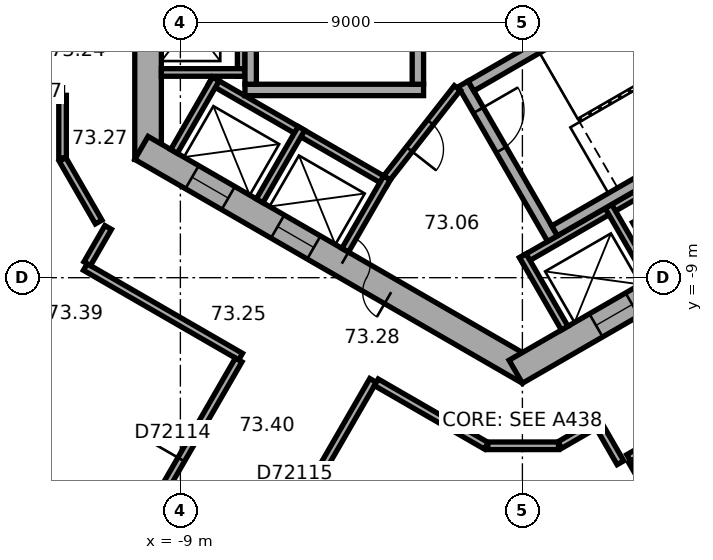
"""IFC4 building model, lengths in metres.
Left out: names, types, materials, properties, quantities, classifications, styles, units other than length and angle.
Written with IfcOpenShell. Run it as: python <this file> out.ifc"""

import sys

from ifc_helpers import new_model, si_unit, direction, frame, frame_2d, origin, place, context, subcontext, project, spatial, rectangle, extrude, element, fill, save


model = new_model("IFC4")
c1 = context("Model", 3, precision=1e-05, world=origin(), true_north=direction((0.0, 1.0)))
c2 = subcontext(c1, "Body", "Model", "MODEL_VIEW")
j1 = project(units=[si_unit("LENGTHUNIT", "METRE"), si_unit("PLANEANGLEUNIT", "RADIAN")], contexts=[c1])
p1 = place(None, origin())
s1 = spatial("IfcSite", under=j1, at=p1, CompositionType="ELEMENT")
p2 = place(p1, origin())
s2 = spatial("IfcBuilding", under=s1, at=p2, CompositionType="ELEMENT")
p3 = place(p2, frame((0.0, 0.0, 296.8)))
s3 = spatial("IfcBuildingStorey", under=s2, at=p3, CompositionType="ELEMENT", Elevation=296.8)
p4 = place(p3, frame((-9.85, 5.889, 0.0), z_axis=(0.0, 0.0, 1.0), x_axis=(0.0, -1.0, 0.0)))
e1 = element("IfcWall", 1, at=p4, inside=s3, PredefinedType="SHEAR", context=c2, shape_type="SweptSolid", body=[
    extrude(rectangle(XDim=11.778, YDim=0.7, at=frame_2d((5.889, 0.0))), origin(), (0.0, 0.0, 1.0), 3.7),
])
p5 = place(p4, frame((5.039, 0.0, 0.0)))
e2 = element("IfcOpeningElement", 2, at=p5, cuts=e1, PredefinedType="OPENING", context=c2, shape_type="SweptSolid", body=[
    extrude(rectangle(XDim=1.1, YDim=2.1, at=frame_2d((0.55, 1.05))), frame((0.0, 0.36, 0.0), z_axis=(0.0, -1.0, 0.0), x_axis=(1.0, 0.0, 0.0)), (0.0, 0.0, 1.0), 0.72),
])
p6 = place(p4, frame((7.639, 0.0, 0.0)))
e3 = element("IfcOpeningElement", 3, at=p6, cuts=e1, PredefinedType="OPENING", context=c2, shape_type="SweptSolid", body=[
    extrude(rectangle(XDim=1.1, YDim=2.1, at=frame_2d((0.55, 1.05))), frame((0.0, 0.36, 0.0), z_axis=(0.0, -1.0, 0.0), x_axis=(1.0, 0.0, 0.0)), (0.0, 0.0, 1.0), 0.72),
])
p7 = place(p3, frame((-10.025, -5.586, 0.0), z_axis=(0.0, 0.0, 1.0), x_axis=(0.866026453023, -0.499998182661, 0.0)))
e4 = element("IfcWall", 4, at=p7, inside=s3, PredefinedType="SHEAR", context=c2, shape_type="SweptSolid", body=[
    extrude(rectangle(XDim=11.778, YDim=0.7, at=frame_2d((5.889, 0.0))), origin(), (0.0, 0.0, 1.0), 3.7),
])
p8 = place(p7, frame((6.089, 0.0, 0.0)))
e5 = element("IfcOpeningElement", 5, at=p8, cuts=e4, PredefinedType="OPENING", context=c2, shape_type="SweptSolid", body=[
    extrude(rectangle(XDim=1.5, YDim=2.1, at=frame_2d((0.75, 1.05))), frame((0.0, 0.36, 0.0), z_axis=(0.0, -1.0, 0.0), x_axis=(1.0, 0.0, 0.0)), (0.0, 0.0, 1.0), 0.72),
])
p9 = place(p7, frame((1.539, 0.0, 0.0)))
e6 = element("IfcOpeningElement", 6, at=p9, cuts=e4, PredefinedType="OPENING", context=c2, shape_type="SweptSolid", body=[
    extrude(rectangle(XDim=1.1, YDim=2.1, at=frame_2d((0.55, 1.05))), frame((0.0, 0.36, 0.0), z_axis=(0.0, -1.0, 0.0), x_axis=(1.0, 0.0, 0.0)), (0.0, 0.0, 1.0), 0.72),
])
p10 = place(p7, frame((4.139, 0.0, 0.0)))
e7 = element("IfcOpeningElement", 7, at=p10, cuts=e4, PredefinedType="OPENING", context=c2, shape_type="SweptSolid", body=[
    extrude(rectangle(XDim=1.1, YDim=2.1, at=frame_2d((0.55, 1.05))), frame((0.0, 0.36, 0.0), z_axis=(0.0, -1.0, 0.0), x_axis=(1.0, 0.0, 0.0)), (0.0, 0.0, 1.0), 0.72),
])
p11 = place(p3, frame((-0.175, -11.475, 0.0), z_axis=(0.0, 0.0, 1.0), x_axis=(0.866026453023, 0.499998182661, 0.0)))
e8 = element("IfcWall", 8, at=p11, inside=s3, PredefinedType="SHEAR", context=c2, shape_type="SweptSolid", body=[
    extrude(rectangle(XDim=11.778, YDim=0.7, at=frame_2d((5.889, 0.0))), origin(), (0.0, 0.0, 1.0), 3.7),
])
p12 = place(p11, frame((2.439, 0.0, 0.0)))
e9 = element("IfcOpeningElement", 9, at=p12, cuts=e8, PredefinedType="OPENING", context=c2, shape_type="SweptSolid", body=[
    extrude(rectangle(XDim=1.1, YDim=2.1, at=frame_2d((0.55, 1.05))), frame((0.0, 0.36, 0.0), z_axis=(0.0, -1.0, 0.0), x_axis=(1.0, 0.0, 0.0)), (0.0, 0.0, 1.0), 0.72),
])
p13 = place(p11, frame((5.039, 0.0, 0.0)))
e10 = element("IfcOpeningElement", 10, at=p13, cuts=e8, PredefinedType="OPENING", context=c2, shape_type="SweptSolid", body=[
    extrude(rectangle(XDim=1.1, YDim=2.1, at=frame_2d((0.55, 1.05))), frame((0.0, 0.36, 0.0), z_axis=(0.0, -1.0, 0.0), x_axis=(1.0, 0.0, 0.0)), (0.0, 0.0, 1.0), 0.72),
])
p14 = place(p11, frame((7.639, 0.0, 0.0)))
e11 = element("IfcOpeningElement", 11, at=p14, cuts=e8, PredefinedType="OPENING", context=c2, shape_type="SweptSolid", body=[
    extrude(rectangle(XDim=1.1, YDim=2.1, at=frame_2d((0.55, 1.05))), frame((0.0, 0.36, 0.0), z_axis=(0.0, -1.0, 0.0), x_axis=(1.0, 0.0, 0.0)), (0.0, 0.0, 1.0), 0.72),
])
p15 = place(p3, frame((-16.626, -12.629, 0.0), z_axis=(0.0, 0.0, 1.0), x_axis=(0.866026460444, -0.499998169808, 0.0)))
e12 = element("IfcWall", 12, at=p15, inside=s3, PredefinedType="STANDARD", context=c2, shape_type="SweptSolid", body=[
    extrude(rectangle(XDim=17.731, YDim=0.2, at=frame_2d((8.866, 0.0))), origin(), (0.0, 0.0, 1.0), 3.7),
])
p16 = place(p15, frame((1.203, 0.0, 0.9)))
e13 = element("IfcOpeningElement", 13, at=p16, cuts=e12, PredefinedType="OPENING", context=c2, shape_type="SweptSolid", body=[
    extrude(rectangle(XDim=2.0, YDim=2.0, at=frame_2d((1.0, 1.0))), frame((0.0, 0.11, 0.0), z_axis=(0.0, -1.0, 0.0), x_axis=(1.0, 0.0, 0.0)), (0.0, 0.0, 1.0), 0.22),
])
p17 = place(p15, frame((4.535, 0.0, 0.9)))
e14 = element("IfcOpeningElement", 14, at=p17, cuts=e12, PredefinedType="OPENING", context=c2, shape_type="SweptSolid", body=[
    extrude(rectangle(XDim=2.0, YDim=2.0, at=frame_2d((1.0, 1.0))), frame((0.0, 0.11, 0.0), z_axis=(0.0, -1.0, 0.0), x_axis=(1.0, 0.0, 0.0)), (0.0, 0.0, 1.0), 0.22),
])
p18 = place(p15, frame((7.867, 0.0, 0.9)))
e15 = element("IfcOpeningElement", 15, at=p18, cuts=e12, PredefinedType="OPENING", context=c2, shape_type="SweptSolid", body=[
    extrude(rectangle(XDim=2.0, YDim=2.0, at=frame_2d((1.0, 1.0))), frame((0.0, 0.11, 0.0), z_axis=(0.0, -1.0, 0.0), x_axis=(1.0, 0.0, 0.0)), (0.0, 0.0, 1.0), 0.22),
])
p19 = place(p15, frame((11.198, 0.0, 0.9)))
e16 = element("IfcOpeningElement", 16, at=p19, cuts=e12, PredefinedType="OPENING", context=c2, shape_type="SweptSolid", body=[
    extrude(rectangle(XDim=2.0, YDim=2.0, at=frame_2d((1.0, 1.0))), frame((0.0, 0.11, 0.0), z_axis=(0.0, -1.0, 0.0), x_axis=(1.0, 0.0, 0.0)), (0.0, 0.0, 1.0), 0.22),
])
p20 = place(p15, frame((14.53, 0.0, 0.9)))
e17 = element("IfcOpeningElement", 17, at=p20, cuts=e12, PredefinedType="OPENING", context=c2, shape_type="SweptSolid", body=[
    extrude(rectangle(XDim=2.0, YDim=2.0, at=frame_2d((1.0, 1.0))), frame((0.0, 0.11, 0.0), z_axis=(0.0, -1.0, 0.0), x_axis=(1.0, 0.0, 0.0)), (0.0, 0.0, 1.0), 0.22),
])
p21 = place(p3, frame((2.58, -21.377, 0.0), z_axis=(0.0, 0.0, 1.0), x_axis=(0.833888592176, 0.551932800112, 0.0)))
e18 = element("IfcWall", 18, at=p21, inside=s3, PredefinedType="STANDARD", context=c2, shape_type="SweptSolid", body=[
    extrude(rectangle(XDim=17.731, YDim=0.2, at=frame_2d((8.866, 0.0))), origin(), (0.0, 0.0, 1.0), 3.7),
])
p22 = place(p21, frame((1.202, 0.0, 0.9)))
e19 = element("IfcOpeningElement", 19, at=p22, cuts=e18, PredefinedType="OPENING", context=c2, shape_type="SweptSolid", body=[
    extrude(rectangle(XDim=2.0, YDim=2.0, at=frame_2d((1.0, 1.0))), frame((0.0, 0.11, 0.0), z_axis=(0.0, -1.0, 0.0), x_axis=(1.0, 0.0, 0.0)), (0.0, 0.0, 1.0), 0.22),
])
p23 = place(p21, frame((4.533, 0.0, 0.9)))
e20 = element("IfcOpeningElement", 20, at=p23, cuts=e18, PredefinedType="OPENING", context=c2, shape_type="SweptSolid", body=[
    extrude(rectangle(XDim=2.0, YDim=2.0, at=frame_2d((1.0, 1.0))), frame((0.0, 0.11, 0.0), z_axis=(0.0, -1.0, 0.0), x_axis=(1.0, 0.0, 0.0)), (0.0, 0.0, 1.0), 0.22),
])
p24 = place(p21, frame((7.865, 0.0, 0.9)))
e21 = element("IfcOpeningElement", 21, at=p24, cuts=e18, PredefinedType="OPENING", context=c2, shape_type="SweptSolid", body=[
    extrude(rectangle(XDim=2.0, YDim=2.0, at=frame_2d((1.0, 1.0))), frame((0.0, 0.11, 0.0), z_axis=(0.0, -1.0, 0.0), x_axis=(1.0, 0.0, 0.0)), (0.0, 0.0, 1.0), 0.22),
])
p25 = place(p21, frame((11.197, 0.0, 0.9)))
e22 = element("IfcOpeningElement", 22, at=p25, cuts=e18, PredefinedType="OPENING", context=c2, shape_type="SweptSolid", body=[
    extrude(rectangle(XDim=2.0, YDim=2.0, at=frame_2d((1.0, 1.0))), frame((0.0, 0.11, 0.0), z_axis=(0.0, -1.0, 0.0), x_axis=(1.0, 0.0, 0.0)), (0.0, 0.0, 1.0), 0.22),
])
p26 = place(p21, frame((14.528, 0.0, 0.9)))
e23 = element("IfcOpeningElement", 23, at=p26, cuts=e18, PredefinedType="OPENING", context=c2, shape_type="SweptSolid", body=[
    extrude(rectangle(XDim=2.0, YDim=2.0, at=frame_2d((1.0, 1.0))), frame((0.0, 0.11, 0.0), z_axis=(0.0, -1.0, 0.0), x_axis=(1.0, 0.0, 0.0)), (0.0, 0.0, 1.0), 0.22),
])
p27 = place(p3, frame((-7.4, 4.3, 0.0), z_axis=(0.0, 0.0, 1.0), x_axis=(0.0, -1.0, 0.0)))
e24 = element("IfcWall", 24, at=p27, inside=s3, PredefinedType="PARTITIONING", context=c2, shape_type="SweptSolid", body=[
    extrude(rectangle(XDim=8.0, YDim=0.2, at=frame_2d((4.0, 0.0))), origin(), (0.0, 0.0, 1.0), 3.35),
])
p28 = place(p3, frame((-7.3, -3.6, 0.0), z_axis=(0.0, 0.0, 1.0), x_axis=(-1.0, 0.0, 0.0)))
e25 = element("IfcWall", 25, at=p28, inside=s3, PredefinedType="PARTITIONING", context=c2, shape_type="SweptSolid", body=[
    extrude(rectangle(XDim=2.2, YDim=0.2, at=frame_2d((1.1, 0.0))), origin(), (0.0, 0.0, 1.0), 3.35),
])
p29 = place(p3, frame((-8.203, -3.809, 0.0), z_axis=(0.0, 0.0, 1.0), x_axis=(0.866028230842, -0.499995103361, 0.0)))
e26 = element("IfcWall", 26, at=p29, inside=s3, PredefinedType="PARTITIONING", context=c2, shape_type="SweptSolid", body=[
    extrude(rectangle(XDim=5.4, YDim=0.2, at=frame_2d((2.7, 0.0))), origin(), (0.0, 0.0, 1.0), 3.35),
])
for number, where, z_axis, x_axis in (
    (27, (-8.067, -3.772, 0.0), (0.0, 0.0, 1.0), (-0.5, -0.866, 0.0)),
    (28, (-5.815, -5.072, 0.0), (0.0, 0.0, 1.0), (-0.5, -0.866, 0.0)),
):
    element("IfcWall", number, at=place(p3, frame(where, z_axis=z_axis, x_axis=x_axis)), inside=s3, PredefinedType="PARTITIONING", context=c2, shape_type="SweptSolid", body=[
        extrude(rectangle(XDim=2.2, YDim=0.2, at=frame_2d((1.1, 0.0))), origin(), (0.0, 0.0, 1.0), 3.35),
    ])
p30 = place(p3, frame((-3.563, -6.372, 0.0), z_axis=(0.0, 0.0, 1.0), x_axis=(-0.499994660107, -0.866028486751, 0.0)))
e29 = element("IfcWall", 29, at=p30, inside=s3, PredefinedType="PARTITIONING", context=c2, shape_type="SweptSolid", body=[
    extrude(rectangle(XDim=2.2, YDim=0.2, at=frame_2d((1.1, 0.0))), origin(), (0.0, 0.0, 1.0), 3.35),
])
p31 = place(p3, frame((-0.024, -8.559, 0.0), z_axis=(0.0, 0.0, 1.0), x_axis=(0.866026010844, 0.49999894854, 0.0)))
e30 = element("IfcWall", 30, at=p31, inside=s3, PredefinedType="PARTITIONING", context=c2, shape_type="SweptSolid", body=[
    extrude(rectangle(XDim=8.0, YDim=0.2, at=frame_2d((4.0, 0.0))), origin(), (0.0, 0.0, 1.0), 3.35),
])
for number, where, z_axis, x_axis in (
    (31, (0.013, -8.422, 0.0), (0.0, 0.0, 1.0), (0.5, -0.866, 0.0)),
    (32, (2.264, -7.122, 0.0), (0.0, 0.0, 1.0), (0.5, -0.866, 0.0)),
):
    element("IfcWall", number, at=place(p3, frame(where, z_axis=z_axis, x_axis=x_axis)), inside=s3, PredefinedType="PARTITIONING", context=c2, shape_type="SweptSolid", body=[
        extrude(rectangle(XDim=2.2, YDim=0.2, at=frame_2d((1.1, 0.0))), origin(), (0.0, 0.0, 1.0), 3.35),
    ])
p32 = place(p3, frame((-2.6, -4.06, 0.0), z_axis=(0.0, 0.0, 1.0), x_axis=(-1.0, 0.0, 0.0)))
e33 = element("IfcWall", 33, at=p32, inside=s3, PredefinedType="SHEAR", context=c2, shape_type="SweptSolid", body=[
    extrude(rectangle(XDim=4.7, YDim=0.3, at=frame_2d((2.35, 0.0))), origin(), (0.0, 0.0, 1.0), 3.35),
])
for number, where, z_axis, x_axis in (
    (34, (-2.75, 3.15, 0.0), (0.0, 0.0, 1.0), (0.0, -1.0, 0.0)),
    (35, (-7.15, 3.15, 0.0), (0.0, 0.0, 1.0), (0.0, -1.0, 0.0)),
):
    element("IfcWall", number, at=place(p3, frame(where, z_axis=z_axis, x_axis=x_axis)), inside=s3, PredefinedType="SHEAR", context=c2, shape_type="SweptSolid", body=[
        extrude(rectangle(XDim=7.06, YDim=0.3, at=frame_2d((3.53, 0.0))), origin(), (0.0, 0.0, 1.0), 3.35),
    ])
p33 = place(p3, frame((-1.558, -3.902, 0.0), z_axis=(0.0, 0.0, 1.0), x_axis=(0.499977259774, -0.866038532462, 0.0)))
e36 = element("IfcWall", 36, at=p33, inside=s3, PredefinedType="SHEAR", context=c2, shape_type="SweptSolid", body=[
    extrude(rectangle(XDim=4.7, YDim=0.3, at=frame_2d((2.35, 0.0))), origin(), (0.0, 0.0, 1.0), 3.35),
])
p34 = place(p33, frame((0.8, 0.0, 0.0)))
e37 = element("IfcOpeningElement", 37, at=p34, cuts=e36, PredefinedType="OPENING", context=c2, shape_type="SweptSolid", body=[
    extrude(rectangle(XDim=1.2, YDim=2.1, at=frame_2d((0.6, 1.05))), frame((0.0, 0.16, 0.0), z_axis=(0.0, -1.0, 0.0), x_axis=(1.0, 0.0, 0.0)), (0.0, 0.0, 1.0), 0.32),
])
for number, where, z_axis, x_axis in (
    (38, (-1.353, -3.957, 0.0), (0.0, 0.0, 1.0), (0.866, 0.5, 0.0)),
    (39, (0.847, -7.767, 0.0), (0.0, 0.0, 1.0), (0.866, 0.5, 0.0)),
):
    element("IfcWall", number, at=place(p3, frame(where, z_axis=z_axis, x_axis=x_axis)), inside=s3, PredefinedType="SHEAR", context=c2, shape_type="SweptSolid", body=[
        extrude(rectangle(XDim=7.06, YDim=0.3, at=frame_2d((3.53, 0.0))), origin(), (0.0, 0.0, 1.0), 3.35),
    ])
p35 = place(p3, frame((-1.712, -4.008, 0.0), z_axis=(0.0, 0.0, 1.0), x_axis=(-0.616549420702, -0.787316208287, 0.0)))
e40 = element("IfcWall", 40, at=p35, inside=s3, PredefinedType="PARTITIONING", context=c2, shape_type="SweptSolid", body=[
    extrude(rectangle(XDim=3.002, YDim=0.2, at=frame_2d((1.501, 0.0))), origin(), (0.0, 0.0, 1.0), 3.35),
])
p36 = place(p35, frame((1.15, 0.0, 0.0)))
e41 = element("IfcOpeningElement", 41, at=p36, cuts=e40, PredefinedType="OPENING", context=c2, shape_type="SweptSolid", body=[
    extrude(rectangle(XDim=0.9, YDim=2.1, at=frame_2d((0.45, 1.05))), frame((0.0, 0.11, 0.0), z_axis=(0.0, -1.0, 0.0), x_axis=(1.0, 0.0, 0.0)), (0.0, 0.0, 1.0), 0.22),
])
p37 = place(p3, frame((-13.301, -4.101, 0.0), z_axis=(0.0, 0.0, 1.0), x_axis=(1.0, 0.0, 0.0)))
e42 = element("IfcWall", 42, at=p37, inside=s3, PredefinedType="PARTITIONING", context=c2, shape_type="SweptSolid", body=[
    extrude(rectangle(XDim=1.201, YDim=0.2, at=frame_2d((0.601, 0.0))), origin(), (0.0, 0.0, 1.0), 3.35),
])
p38 = place(p3, frame((-12.1, -5.889, 0.0), z_axis=(0.0, 0.0, 1.0), x_axis=(0.500063520245, -0.865988727248, 0.0)))
e43 = element("IfcWall", 43, at=p38, inside=s3, PredefinedType="PARTITIONING", context=c2, shape_type="SweptSolid", body=[
    extrude(rectangle(XDim=1.9, YDim=0.2, at=frame_2d((0.95, 0.0))), origin(), (0.0, 0.0, 1.0), 3.35),
])
p39 = place(p3, frame((-12.1, -4.201, 0.0), z_axis=(0.0, 0.0, 1.0), x_axis=(0.0, -1.0, 0.0)))
e44 = element("IfcWall", 44, at=p39, inside=s3, PredefinedType="PARTITIONING", context=c2, shape_type="SweptSolid", body=[
    extrude(rectangle(XDim=1.648, YDim=0.2, at=frame_2d((0.824, 0.0))), origin(), (0.0, 0.0, 1.0), 3.35),
])
p40 = place(p3, frame((-11.501, -8.719, 0.0), z_axis=(0.0, 0.0, 1.0), x_axis=(0.866024434742, -0.500001678427, 0.0)))
e45 = element("IfcWall", 45, at=p40, inside=s3, PredefinedType="PARTITIONING", context=c2, shape_type="SweptSolid", body=[
    extrude(rectangle(XDim=4.718, YDim=0.2, at=frame_2d((2.359, 0.0))), origin(), (0.0, 0.0, 1.0), 3.35),
])
p41 = place(p3, frame((-10.901, -7.678, 0.0), z_axis=(0.0, 0.0, 1.0), x_axis=(-0.500074377092, -0.865982457891, 0.0)))
e46 = element("IfcWall", 46, at=p41, inside=s3, PredefinedType="PARTITIONING", context=c2, shape_type="SweptSolid", body=[
    extrude(rectangle(XDim=1.101, YDim=0.2, at=frame_2d((0.55, 0.0))), origin(), (0.0, 0.0, 1.0), 3.35),
])
p42 = place(p3, frame((-9.99, -15.537, 0.0), z_axis=(0.0, 0.0, 1.0), x_axis=(0.499966611936, 0.866044679534, 0.0)))
e47 = element("IfcWall", 47, at=p42, inside=s3, PredefinedType="PARTITIONING", context=c2, shape_type="SweptSolid", body=[
    extrude(rectangle(XDim=5.049, YDim=0.2, at=frame_2d((2.524, 0.0))), origin(), (0.0, 0.0, 1.0), 2.65),
])
p43 = place(p42, frame((2.024, 0.0, 0.0)))
e48 = element("IfcOpeningElement", 48, at=p43, cuts=e47, PredefinedType="OPENING", context=c2, shape_type="SweptSolid", body=[
    extrude(rectangle(XDim=1.0, YDim=2.1, at=frame_2d((0.5, 1.05))), frame((0.0, 0.11, 0.0), z_axis=(0.0, -1.0, 0.0), x_axis=(1.0, 0.0, 0.0)), (0.0, 0.0, 1.0), 0.22),
])
p44 = place(p3, frame((-7.105, -17.202, 0.0), z_axis=(0.0, 0.0, 1.0), x_axis=(0.499988692146, 0.866031932279, 0.0)))
e49 = element("IfcWall", 49, at=p44, inside=s3, PredefinedType="PARTITIONING", context=c2, shape_type="SweptSolid", body=[
    extrude(rectangle(XDim=6.35, YDim=0.2, at=frame_2d((3.175, 0.0))), origin(), (0.0, 0.0, 1.0), 3.35),
])
p45 = place(p44, frame((2.675, 0.0, 0.0)))
e50 = element("IfcOpeningElement", 50, at=p45, cuts=e49, PredefinedType="OPENING", context=c2, shape_type="SweptSolid", body=[
    extrude(rectangle(XDim=1.0, YDim=2.1, at=frame_2d((0.5, 1.05))), frame((0.0, 0.11, 0.0), z_axis=(0.0, -1.0, 0.0), x_axis=(1.0, 0.0, 0.0)), (0.0, 0.0, 1.0), 0.22),
])
p46 = place(p3, frame((-3.843, -11.753, 0.0), z_axis=(0.0, 0.0, 1.0), x_axis=(0.866031037473, -0.499990242038, 0.0)))
e51 = element("IfcWall", 51, at=p46, inside=s3, PredefinedType="PARTITIONING", context=c2, shape_type="SweptSolid", body=[
    extrude(rectangle(XDim=3.341, YDim=0.2, at=frame_2d((1.67, 0.0))), origin(), (0.0, 0.0, 1.0), 3.35),
])
p47 = place(p3, frame((-0.91, -13.423, 0.0), z_axis=(0.0, 0.0, 1.0), x_axis=(1.0, 0.0, 0.0)))
e52 = element("IfcWall", 52, at=p47, inside=s3, PredefinedType="PARTITIONING", context=c2, shape_type="SweptSolid", body=[
    extrude(rectangle(XDim=1.86, YDim=0.2, at=frame_2d((0.93, 0.0))), origin(), (0.0, 0.0, 1.0), 3.35),
])
p48 = place(p3, frame((0.985, -13.403, 0.0), z_axis=(0.0, 0.0, 1.0), x_axis=(0.866022668282, 0.500004737999, 0.0)))
e53 = element("IfcWall", 53, at=p48, inside=s3, PredefinedType="PARTITIONING", context=c2, shape_type="SweptSolid", body=[
    extrude(rectangle(XDim=1.148, YDim=0.2, at=frame_2d((0.574, 0.0))), origin(), (0.0, 0.0, 1.0), 3.35),
])
p49 = place(p3, frame((2.029, -12.916, 0.0), z_axis=(0.0, 0.0, 1.0), x_axis=(0.500074377092, -0.865982457891, 0.0)))
e54 = element("IfcWall", 54, at=p49, inside=s3, PredefinedType="PARTITIONING", context=c2, shape_type="SweptSolid", body=[
    extrude(rectangle(XDim=1.101, YDim=0.2, at=frame_2d((0.55, 0.0))), origin(), (0.0, 0.0, 1.0), 3.35),
])
p50 = place(p3, frame((2.796, -13.744, 0.0), z_axis=(0.0, 0.0, 1.0), x_axis=(0.86605622881, 0.499946605688, 0.0)))
e55 = element("IfcWall", 55, at=p50, inside=s3, PredefinedType="PARTITIONING", context=c2, shape_type="SweptSolid", body=[
    extrude(rectangle(XDim=2.2, YDim=0.2, at=frame_2d((1.1, 0.0))), origin(), (0.0, 0.0, 1.0), 3.35),
])
p51 = place(p3, frame((4.096, -15.996, 0.0), z_axis=(0.0, 0.0, 1.0), x_axis=(-0.500004234368, 0.866022959057, 0.0)))
e56 = element("IfcWall", 56, at=p51, inside=s3, PredefinedType="PARTITIONING", context=c2, shape_type="SweptSolid", body=[
    extrude(rectangle(XDim=2.5, YDim=0.12, at=frame_2d((1.25, 0.0))), origin(), (0.0, 0.0, 1.0), 3.35),
])
p52 = place(p51, frame((0.8, 0.0, 0.0)))
e57 = element("IfcOpeningElement", 57, at=p52, cuts=e56, PredefinedType="OPENING", context=c2, shape_type="SweptSolid", body=[
    extrude(rectangle(XDim=0.9, YDim=2.1, at=frame_2d((0.45, 1.05))), frame((0.0, 0.07, 0.0), z_axis=(0.0, -1.0, 0.0), x_axis=(1.0, 0.0, 0.0)), (0.0, 0.0, 1.0), 0.14),
])
p53 = place(p8, origin())
e58 = element("IfcDoor", 58, at=p53, inside=s3, OperationType="DOUBLE_DOOR_SINGLE_SWING", PredefinedType="DOOR", context=c2, shape_type="SweptSolid", body=[
    extrude(rectangle(XDim=1.5, YDim=2.1, at=frame_2d((0.75, 1.05))), frame((0.0, 0.025, 0.0), z_axis=(0.0, -1.0, 0.0), x_axis=(1.0, 0.0, 0.0)), (0.0, 0.0, 1.0), 0.05),
])
fill(e5, e58)
p54 = place(p34, origin())
e59 = element("IfcDoor", 59, at=p54, inside=s3, OperationType="SINGLE_SWING_RIGHT", PredefinedType="DOOR", context=c2, shape_type="SweptSolid", body=[
    extrude(rectangle(XDim=1.2, YDim=2.1, at=frame_2d((0.6, 1.05))), frame((0.0, 0.025, 0.0), z_axis=(0.0, -1.0, 0.0), x_axis=(1.0, 0.0, 0.0)), (0.0, 0.0, 1.0), 0.05),
])
fill(e37, e59)
p55 = place(p36, origin())
e60 = element("IfcDoor", 60, at=p55, inside=s3, OperationType="SINGLE_SWING_LEFT", PredefinedType="DOOR", context=c2, shape_type="SweptSolid", body=[
    extrude(rectangle(XDim=0.9, YDim=2.1, at=frame_2d((0.45, 1.05))), frame((0.0, 0.025, 0.0), z_axis=(0.0, -1.0, 0.0), x_axis=(1.0, 0.0, 0.0)), (0.0, 0.0, 1.0), 0.05),
])
fill(e41, e60)
p56 = place(p9, origin())
e61 = element("IfcDoor", 61, at=p56, inside=s3, OperationType="DOUBLE_DOOR_SLIDING", PredefinedType="DOOR", context=c2, shape_type="SweptSolid", body=[
    extrude(rectangle(XDim=1.1, YDim=2.1, at=frame_2d((0.55, 1.05))), frame((0.0, 0.025, 0.0), z_axis=(0.0, -1.0, 0.0), x_axis=(1.0, 0.0, 0.0)), (0.0, 0.0, 1.0), 0.05),
])
fill(e6, e61)
p57 = place(p10, origin())
e62 = element("IfcDoor", 62, at=p57, inside=s3, OperationType="DOUBLE_DOOR_SLIDING", PredefinedType="DOOR", context=c2, shape_type="SweptSolid", body=[
    extrude(rectangle(XDim=1.1, YDim=2.1, at=frame_2d((0.55, 1.05))), frame((0.0, 0.025, 0.0), z_axis=(0.0, -1.0, 0.0), x_axis=(1.0, 0.0, 0.0)), (0.0, 0.0, 1.0), 0.05),
])
fill(e7, e62)
p58 = place(p12, origin())
e63 = element("IfcDoor", 63, at=p58, inside=s3, OperationType="DOUBLE_DOOR_SLIDING", PredefinedType="DOOR", context=c2, shape_type="SweptSolid", body=[
    extrude(rectangle(XDim=1.1, YDim=2.1, at=frame_2d((0.55, 1.05))), frame((0.0, 0.025, 0.0), z_axis=(0.0, -1.0, 0.0), x_axis=(1.0, 0.0, 0.0)), (0.0, 0.0, 1.0), 0.05),
])
fill(e9, e63)
p59 = place(p43, origin())
e64 = element("IfcDoor", 64, at=p59, inside=s3, OperationType="SINGLE_SWING_LEFT", PredefinedType="DOOR", context=c2, shape_type="SweptSolid", body=[
    extrude(rectangle(XDim=1.0, YDim=2.1, at=frame_2d((0.5, 1.05))), frame((0.0, 0.025, 0.0), z_axis=(0.0, -1.0, 0.0), x_axis=(1.0, 0.0, 0.0)), (0.0, 0.0, 1.0), 0.05),
])
fill(e48, e64)
p60 = place(p45, origin())
e65 = element("IfcDoor", 65, at=p60, inside=s3, OperationType="SINGLE_SWING_LEFT", PredefinedType="DOOR", context=c2, shape_type="SweptSolid", body=[
    extrude(rectangle(XDim=1.0, YDim=2.1, at=frame_2d((0.5, 1.05))), frame((0.0, 0.025, 0.0), z_axis=(0.0, -1.0, 0.0), x_axis=(1.0, 0.0, 0.0)), (0.0, 0.0, 1.0), 0.05),
])
fill(e50, e65)
save(model, sys.argv[1])
